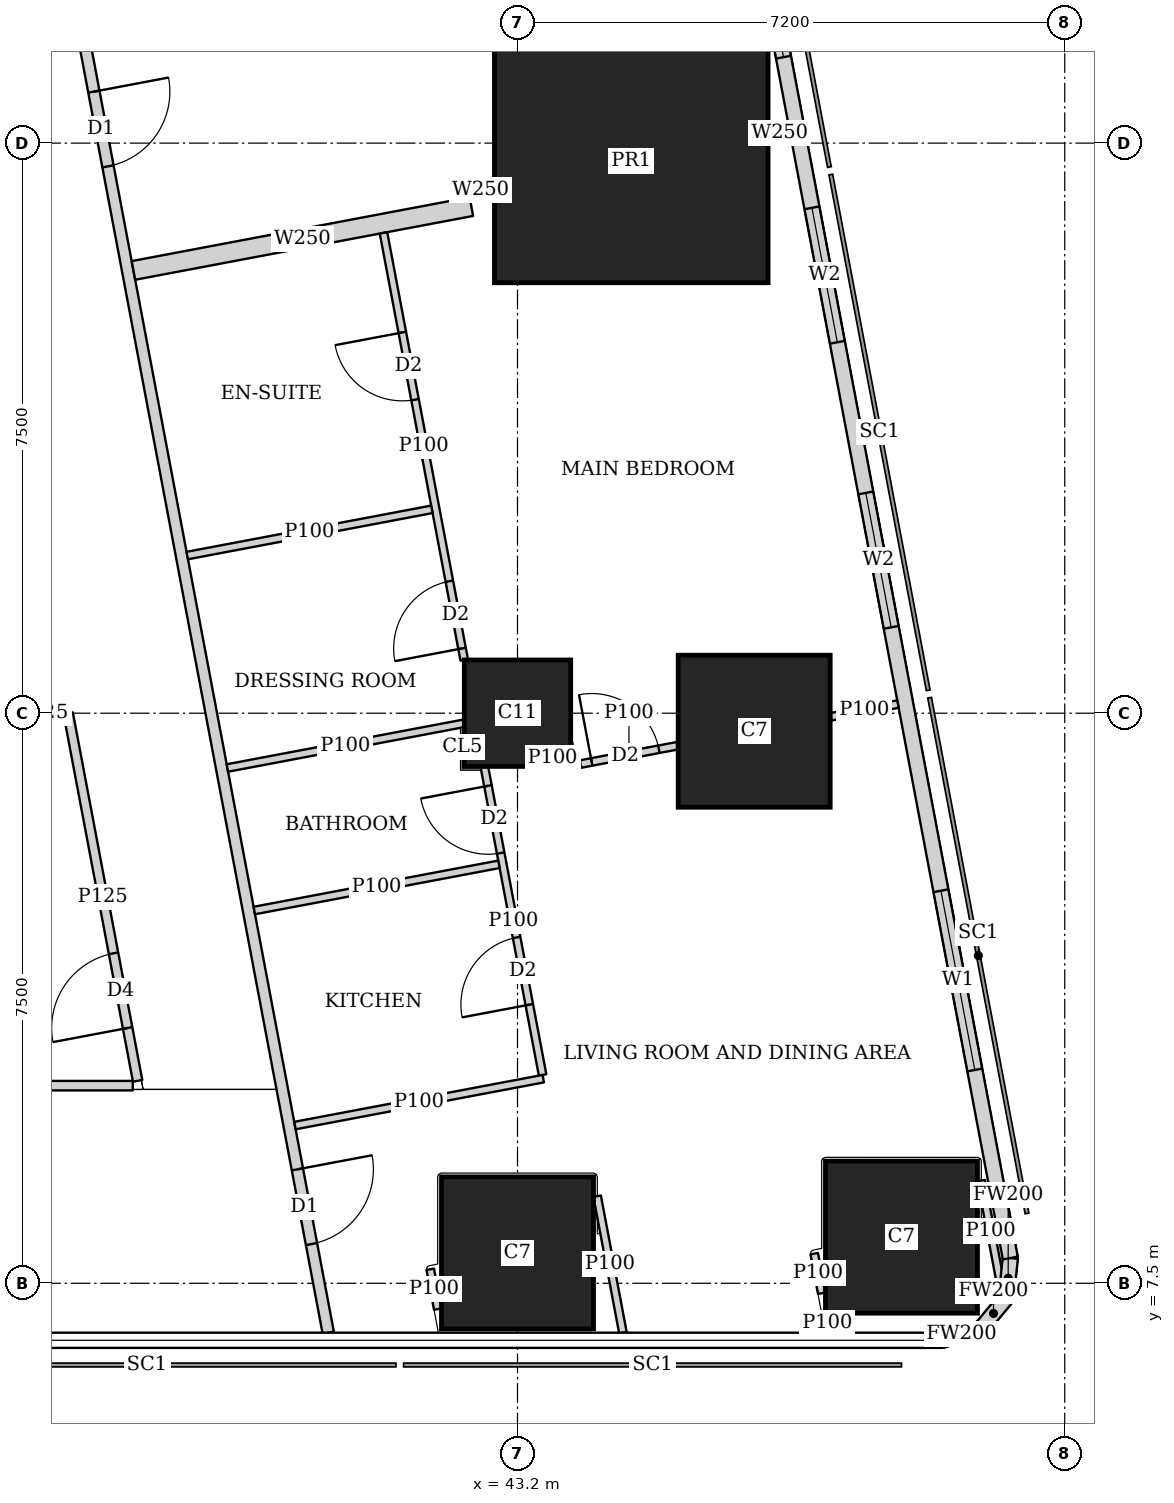
"""IFC4 building model, lengths in metres.
Left out: names, types, materials, properties, quantities, classifications, styles, units other than length and angle.
Written with IfcOpenShell. Run it as: python <this file> out.ifc"""

import sys

from ifc_helpers import new_model, si_unit, direction, frame, frame_2d, origin, origin_2d, place, context, subcontext, project, spatial, rectangle, extrude, element, fill, save


model = new_model("IFC4")
c1 = context("Model", 3, precision=1e-05, world=origin(), true_north=direction((0.0, 1.0)))
c2 = subcontext(c1, "Body", "Model", "MODEL_VIEW")
j1 = project(units=[si_unit("LENGTHUNIT", "METRE"), si_unit("PLANEANGLEUNIT", "RADIAN")], contexts=[c1])
p1 = place(None, origin())
s1 = spatial("IfcSite", under=j1, at=p1, CompositionType="ELEMENT")
p2 = place(p1, origin())
s2 = spatial("IfcBuilding", under=s1, at=p2, CompositionType="ELEMENT")
p3 = place(p2, frame((0.0, 0.0, 285.35)))
s3 = spatial("IfcBuildingStorey", under=s2, at=p3, CompositionType="ELEMENT", Elevation=285.35)
for number, where, z_axis, x_axis in (
    (1, (43.2, 7.9, 0.0), (0.0, 0.0, 1.0), (1.0, 0.0, 0.0)),
    (2, (48.252, 8.107, 0.0), (0.0, 0.0, 1.0), (1.0, 0.0, 0.0)),
):
    element("IfcColumn", number, at=place(p3, frame(where, z_axis=z_axis, x_axis=x_axis)), inside=s3, PredefinedType="COLUMN", context=c2, shape_type="SweptSolid", body=[
        extrude(rectangle(XDim=2.0, YDim=2.0, at=origin_2d()), origin(), (0.0, 0.0, 1.0), 3.75),
    ])
p4 = place(p3, frame((43.2, 15.0, 0.0), z_axis=(0.0, 0.0, 1.0), x_axis=(1.0, 0.0, 0.0)))
e3 = element("IfcColumn", 3, at=p4, inside=s3, PredefinedType="COLUMN", context=c2, shape_type="SweptSolid", body=[
    extrude(rectangle(XDim=1.4, YDim=1.4, at=origin_2d()), origin(), (0.0, 0.0, 1.0), 3.75),
])
p5 = place(p3, frame((46.314, 14.763, 0.0), z_axis=(0.0, 0.0, 1.0), x_axis=(1.0, 0.0, 0.0)))
e4 = element("IfcColumn", 4, at=p5, inside=s3, PredefinedType="COLUMN", context=c2, shape_type="SweptSolid", body=[
    extrude(rectangle(XDim=2.0, YDim=2.0, at=origin_2d()), origin(), (0.0, 0.0, 1.0), 3.75),
])
p6 = place(p3, frame((44.697, 22.263, 0.0), z_axis=(0.0, 0.0, 1.0), x_axis=(1.0, 0.0, 0.0)))
e5 = element("IfcColumn", 5, at=p6, inside=s3, PredefinedType="COLUMN", context=c2, shape_type="SweptSolid", body=[
    extrude(rectangle(XDim=3.6, YDim=3.2, at=origin_2d()), origin(), (0.0, 0.0, 1.0), 3.75),
])
p7 = place(p3, frame((48.787, 6.75, 0.0), z_axis=(0.0, 0.0, 1.0), x_axis=(0.957282247819, 0.289155145225, 0.0)))
e6 = element("IfcWall", 6, at=p7, inside=s3, PredefinedType="SOLIDWALL", context=c2, shape_type="SweptSolid", body=[
    extrude(rectangle(XDim=0.533, YDim=0.2, at=frame_2d((0.266, 0.0))), origin(), (0.0, 0.0, 1.0), 3.5),
])
p8 = place(p3, frame((49.297, 6.904, 0.0), z_axis=(0.0, 0.0, 1.0), x_axis=(0.639255849474, 0.768994121508, 0.0)))
e7 = element("IfcWall", 7, at=p8, inside=s3, PredefinedType="SOLIDWALL", context=c2, shape_type="SweptSolid", body=[
    extrude(rectangle(XDim=0.518, YDim=0.2, at=frame_2d((0.259, 0.0))), origin(), (0.0, 0.0, 1.0), 3.5),
])
p9 = place(p3, frame((49.628, 7.302, 0.0), z_axis=(0.0, 0.0, 1.0), x_axis=(0.105352390132, 0.994434952068, 0.0)))
e8 = element("IfcWall", 8, at=p9, inside=s3, PredefinedType="SOLIDWALL", context=c2, shape_type="SweptSolid", body=[
    extrude(rectangle(XDim=0.533, YDim=0.2, at=frame_2d((0.267, 0.0))), origin(), (0.0, 0.0, 1.0), 3.5),
])
p10 = place(p3, frame((49.684, 7.832, 0.0), z_axis=(0.0, 0.0, 1.0), x_axis=(-0.185616669694, 0.982622232565, 0.0)))
e9 = element("IfcWall", 9, at=p10, inside=s3, PredefinedType="SOLIDWALL", context=c2, shape_type="SweptSolid", body=[
    extrude(rectangle(XDim=36.0, YDim=0.2, at=frame_2d((18.0, 0.0))), origin(), (0.0, 0.0, 1.0), 3.5),
])
p11 = place(p10, frame((2.518, 0.0, 0.9)))
e10 = element("IfcOpeningElement", 10, at=p11, cuts=e9, PredefinedType="OPENING", context=c2, shape_type="SweptSolid", body=[
    extrude(rectangle(XDim=2.4, YDim=1.5, at=frame_2d((1.2, 0.75))), frame((0.0, 0.11, 0.0), z_axis=(0.0, -1.0, 0.0), x_axis=(1.0, 0.0, 0.0)), (0.0, 0.0, 1.0), 0.22),
])
p12 = place(p10, frame((8.444, 0.0, 0.9)))
e11 = element("IfcOpeningElement", 11, at=p12, cuts=e9, PredefinedType="OPENING", context=c2, shape_type="SweptSolid", body=[
    extrude(rectangle(XDim=1.8, YDim=1.5, at=frame_2d((0.9, 0.75))), frame((0.0, 0.11, 0.0), z_axis=(0.0, -1.0, 0.0), x_axis=(1.0, 0.0, 0.0)), (0.0, 0.0, 1.0), 0.22),
])
p13 = place(p10, frame((12.261, 0.0, 0.9)))
e12 = element("IfcOpeningElement", 12, at=p13, cuts=e9, PredefinedType="OPENING", context=c2, shape_type="SweptSolid", body=[
    extrude(rectangle(XDim=1.8, YDim=1.5, at=frame_2d((0.9, 0.75))), frame((0.0, 0.11, 0.0), z_axis=(0.0, -1.0, 0.0), x_axis=(1.0, 0.0, 0.0)), (0.0, 0.0, 1.0), 0.22),
])
p14 = place(p10, frame((16.078, 0.0, 0.9)))
e13 = element("IfcOpeningElement", 13, at=p14, cuts=e9, PredefinedType="OPENING", context=c2, shape_type="SweptSolid", body=[
    extrude(rectangle(XDim=1.8, YDim=1.5, at=frame_2d((0.9, 0.75))), frame((0.0, 0.11, 0.0), z_axis=(0.0, -1.0, 0.0), x_axis=(1.0, 0.0, 0.0)), (0.0, 0.0, 1.0), 0.22),
])
p15 = place(p10, frame((19.894, 0.0, 0.9)))
e14 = element("IfcOpeningElement", 14, at=p15, cuts=e9, PredefinedType="OPENING", context=c2, shape_type="SweptSolid", body=[
    extrude(rectangle(XDim=1.8, YDim=1.5, at=frame_2d((0.9, 0.75))), frame((0.0, 0.11, 0.0), z_axis=(0.0, -1.0, 0.0), x_axis=(1.0, 0.0, 0.0)), (0.0, 0.0, 1.0), 0.22),
])
p16 = place(p10, frame((23.71, 0.0, 0.9)))
e15 = element("IfcOpeningElement", 15, at=p16, cuts=e9, PredefinedType="OPENING", context=c2, shape_type="SweptSolid", body=[
    extrude(rectangle(XDim=1.8, YDim=1.5, at=frame_2d((0.9, 0.75))), frame((0.0, 0.11, 0.0), z_axis=(0.0, -1.0, 0.0), x_axis=(1.0, 0.0, 0.0)), (0.0, 0.0, 1.0), 0.22),
])
p17 = place(p10, frame((27.526, 0.0, 0.9)))
e16 = element("IfcOpeningElement", 16, at=p17, cuts=e9, PredefinedType="OPENING", context=c2, shape_type="SweptSolid", body=[
    extrude(rectangle(XDim=1.8, YDim=1.5, at=frame_2d((0.9, 0.75))), frame((0.0, 0.11, 0.0), z_axis=(0.0, -1.0, 0.0), x_axis=(1.0, 0.0, 0.0)), (0.0, 0.0, 1.0), 0.22),
])
p18 = place(p10, frame((32.046, 0.0, 0.9)))
e17 = element("IfcOpeningElement", 17, at=p18, cuts=e9, PredefinedType="OPENING", context=c2, shape_type="SweptSolid", body=[
    extrude(rectangle(XDim=1.8, YDim=1.5, at=frame_2d((0.9, 0.75))), frame((0.0, 0.11, 0.0), z_axis=(0.0, -1.0, 0.0), x_axis=(1.0, 0.0, 0.0)), (0.0, 0.0, 1.0), 0.22),
])
p19 = place(p3, frame((34.036, 42.186, 0.0), z_axis=(0.0, 0.0, 1.0), x_axis=(0.185593518645, -0.9826266055, 0.0)))
e18 = element("IfcWall", 18, at=p19, inside=s3, PredefinedType="SOLIDWALL", context=c2, shape_type="SweptSolid", body=[
    extrude(rectangle(XDim=35.961, YDim=0.15, at=frame_2d((17.98, 0.0))), origin(), (0.0, 0.0, 1.0), 2.5),
])
p20 = place(p19, frame((19.345, 0.0, 0.0)))
e19 = element("IfcOpeningElement", 19, at=p20, cuts=e18, PredefinedType="OPENING", context=c2, shape_type="SweptSolid", body=[
    extrude(rectangle(XDim=1.0, YDim=2.1, at=frame_2d((0.5, 1.05))), frame((0.0, 0.085, 0.0), z_axis=(0.0, -1.0, 0.0), x_axis=(1.0, 0.0, 0.0)), (0.0, 0.0, 1.0), 0.17),
])
p21 = place(p19, frame((33.774, 0.0, 0.0)))
e20 = element("IfcOpeningElement", 20, at=p21, cuts=e18, PredefinedType="OPENING", context=c2, shape_type="SweptSolid", body=[
    extrude(rectangle(XDim=1.0, YDim=2.1, at=frame_2d((0.5, 1.05))), frame((0.0, 0.085, 0.0), z_axis=(0.0, -1.0, 0.0), x_axis=(1.0, 0.0, 0.0)), (0.0, 0.0, 1.0), 0.17),
])
p22 = place(p3, frame((44.248, 8.646, 0.0), z_axis=(0.0, 0.0, 1.0), x_axis=(0.185417594585, -0.982659816833, 0.0)))
e21 = element("IfcWall", 21, at=p22, inside=s3, PredefinedType="PARTITIONING", context=c2, shape_type="SweptSolid", body=[
    extrude(rectangle(XDim=1.828, YDim=0.1, at=frame_2d((0.914, 0.0))), origin(), (0.0, 0.0, 1.0), 2.05),
])
p23 = place(p3, frame((42.151, 7.16, 0.0), z_axis=(0.0, 0.0, 1.0), x_axis=(-0.185366164644, 0.982669519729, 0.0)))
e22 = element("IfcWall", 22, at=p23, inside=s3, PredefinedType="PARTITIONING", context=c2, shape_type="SweptSolid", body=[
    extrude(rectangle(XDim=0.533, YDim=0.1, at=frame_2d((0.267, 0.0))), origin(), (0.0, 0.0, 1.0), 2.5),
])
p24 = place(p3, frame((49.3, 8.851, 0.0), z_axis=(0.0, 0.0, 1.0), x_axis=(0.18581620423, -0.982584519645, 0.0)))
e23 = element("IfcWall", 23, at=p24, inside=s3, PredefinedType="PARTITIONING", context=c2, shape_type="SweptSolid", body=[
    extrude(rectangle(XDim=1.351, YDim=0.1, at=frame_2d((0.675, 0.0))), origin(), (0.0, 0.0, 1.0), 3.5),
])
p25 = place(p3, frame((47.301, 6.85, 0.0), z_axis=(0.0, 0.0, 1.0), x_axis=(-0.187513903188, 0.982261948826, 0.0)))
e24 = element("IfcWall", 24, at=p25, inside=s3, PredefinedType="PARTITIONING", context=c2, shape_type="SweptSolid", body=[
    extrude(rectangle(XDim=0.251, YDim=0.1, at=frame_2d((0.125, 0.0))), origin(), (0.0, 0.0, 1.0), 3.5),
])
p26 = place(p3, frame((47.203, 7.369, 0.0), z_axis=(0.0, 0.0, 1.0), x_axis=(-0.186456243114, 0.982463266185, 0.0)))
e25 = element("IfcWall", 25, at=p26, inside=s3, PredefinedType="PARTITIONING", context=c2, shape_type="SweptSolid", body=[
    extrude(rectangle(XDim=0.53, YDim=0.1, at=frame_2d((0.265, 0.0))), origin(), (0.0, 0.0, 1.0), 2.05),
])
p27 = place(p3, frame((46.782, 22.657, 0.0), z_axis=(0.0, 0.0, 1.0), x_axis=(-0.982104607121, -0.188336243648, 0.0)))
e26 = element("IfcWall", 26, at=p27, inside=s3, PredefinedType="SOLIDWALL", context=c2, shape_type="SweptSolid", body=[
    extrude(rectangle(XDim=0.266, YDim=0.25, at=frame_2d((0.133, 0.0))), origin(), (0.0, 0.0, 1.0), 3.5),
])
p28 = place(p3, frame((42.873, 21.918, 0.0), z_axis=(0.0, 0.0, 1.0), x_axis=(-0.982431406936, -0.186624035603, 0.0)))
e27 = element("IfcWall", 27, at=p28, inside=s3, PredefinedType="SOLIDWALL", context=c2, shape_type="SweptSolid", body=[
    extrude(rectangle(XDim=0.322, YDim=0.25, at=frame_2d((0.161, 0.0))), origin(), (0.0, 0.0, 1.0), 2.5),
])
p29 = place(p3, frame((42.593, 21.665, 0.0), z_axis=(0.0, 0.0, 1.0), x_axis=(-0.982612837616, -0.185666398014, 0.0)))
e28 = element("IfcWall", 28, at=p29, inside=s3, PredefinedType="SOLIDWALL", context=c2, shape_type="SweptSolid", body=[
    extrude(rectangle(XDim=4.525, YDim=0.25, at=frame_2d((2.262, 0.0))), origin(), (0.0, 0.0, 1.0), 2.5),
])
p30 = place(p3, frame((48.206, 15.12, 0.0), z_axis=(0.0, 0.0, 1.0), x_axis=(-0.982497680814, -0.186274816318, 0.0)))
e29 = element("IfcWall", 29, at=p30, inside=s3, PredefinedType="PARTITIONING", context=c2, shape_type="SweptSolid", body=[
    extrude(rectangle(XDim=0.898, YDim=0.1, at=frame_2d((0.449, 0.0))), origin(), (0.0, 0.0, 1.0), 3.5),
])
p31 = place(p3, frame((45.304, 14.572, 0.0), z_axis=(0.0, 0.0, 1.0), x_axis=(-0.982602741717, -0.185719821156, 0.0)))
e30 = element("IfcWall", 30, at=p31, inside=s3, PredefinedType="PARTITIONING", context=c2, shape_type="SweptSolid", body=[
    extrude(rectangle(XDim=1.297, YDim=0.1, at=frame_2d((0.649, 0.0))), origin(), (0.0, 0.0, 1.0), 3.5),
])
p32 = place(p31, frame((0.248, 0.0, 0.0)))
e31 = element("IfcOpeningElement", 31, at=p32, cuts=e30, PredefinedType="OPENING", context=c2, shape_type="SweptSolid", body=[
    extrude(rectangle(XDim=0.9, YDim=2.1, at=frame_2d((0.45, 1.05))), frame((0.0, 0.06, 0.0), z_axis=(0.0, -1.0, 0.0), x_axis=(1.0, 0.0, 0.0)), (0.0, 0.0, 1.0), 0.12),
])
p33 = place(p3, frame((43.949, 14.485, 0.0), z_axis=(0.0, 0.0, 1.0), x_axis=(0.188651210932, -0.982044154106, 0.0)))
e32 = element("IfcWall", 32, at=p33, inside=s3, PredefinedType="PARTITIONING", context=c2, shape_type="SweptSolid", body=[
    extrude(rectangle(XDim=0.138, YDim=0.1, at=frame_2d((0.069, 0.0))), origin(), (0.0, 0.0, 1.0), 3.5),
])
p34 = place(p3, frame((42.073, 17.682, 0.0), z_axis=(0.0, 0.0, 1.0), x_axis=(-0.982620626894, -0.185625169636, 0.0)))
e33 = element("IfcWall", 33, at=p34, inside=s3, PredefinedType="PARTITIONING", context=c2, shape_type="SweptSolid", body=[
    extrude(rectangle(XDim=3.275, YDim=0.1, at=frame_2d((1.637, 0.0))), origin(), (0.0, 0.0, 1.0), 3.5),
])
p35 = place(p3, frame((42.49, 14.866, 0.0), z_axis=(0.0, 0.0, 1.0), x_axis=(-0.982621285075, -0.185621685472, 0.0)))
e34 = element("IfcWall", 34, at=p35, inside=s3, PredefinedType="PARTITIONING", context=c2, shape_type="SweptSolid", body=[
    extrude(rectangle(XDim=3.162, YDim=0.1, at=frame_2d((1.581, 0.0))), origin(), (0.0, 0.0, 1.0), 3.5),
])
p36 = place(p3, frame((42.956, 13.012, 0.0), z_axis=(0.0, 0.0, 1.0), x_axis=(-0.982630897129, -0.185570795135, 0.0)))
e35 = element("IfcWall", 35, at=p36, inside=s3, PredefinedType="PARTITIONING", context=c2, shape_type="SweptSolid", body=[
    extrude(rectangle(XDim=3.276, YDim=0.1, at=frame_2d((1.638, 0.0))), origin(), (0.0, 0.0, 1.0), 3.5),
])
p37 = place(p3, frame((43.539, 10.192, 0.0), z_axis=(0.0, 0.0, 1.0), x_axis=(-0.982633623707, -0.185556356831, 0.0)))
e36 = element("IfcWall", 36, at=p37, inside=s3, PredefinedType="PARTITIONING", context=c2, shape_type="SweptSolid", body=[
    extrude(rectangle(XDim=3.325, YDim=0.1, at=frame_2d((1.663, 0.0))), origin(), (0.0, 0.0, 1.0), 3.5),
])
p38 = place(p3, frame((41.437, 21.319, 0.0), z_axis=(0.0, 0.0, 1.0), x_axis=(0.185742368638, -0.982598479794, 0.0)))
e37 = element("IfcWall", 37, at=p38, inside=s3, PredefinedType="PARTITIONING", context=c2, shape_type="SweptSolid", body=[
    extrude(rectangle(XDim=5.718, YDim=0.1, at=frame_2d((2.859, 0.0))), origin(), (0.0, 0.0, 1.0), 3.5),
])
p39 = place(p38, frame((1.333, 0.0, 0.0)))
e38 = element("IfcOpeningElement", 38, at=p39, cuts=e37, PredefinedType="OPENING", context=c2, shape_type="SweptSolid", body=[
    extrude(rectangle(XDim=0.9, YDim=2.1, at=frame_2d((0.45, 1.05))), frame((0.0, 0.06, 0.0), z_axis=(0.0, -1.0, 0.0), x_axis=(1.0, 0.0, 0.0)), (0.0, 0.0, 1.0), 0.12),
])
p40 = place(p38, frame((4.664, 0.0, 0.0)))
e39 = element("IfcOpeningElement", 39, at=p40, cuts=e37, PredefinedType="OPENING", context=c2, shape_type="SweptSolid", body=[
    extrude(rectangle(XDim=0.9, YDim=2.1, at=frame_2d((0.45, 1.05))), frame((0.0, 0.06, 0.0), z_axis=(0.0, -1.0, 0.0), x_axis=(1.0, 0.0, 0.0)), (0.0, 0.0, 1.0), 0.12),
])
p41 = place(p3, frame((42.765, 14.29, 0.0), z_axis=(0.0, 0.0, 1.0), x_axis=(0.185679870644, -0.982610291844, 0.0)))
e40 = element("IfcWall", 40, at=p41, inside=s3, PredefinedType="PARTITIONING", context=c2, shape_type="SweptSolid", body=[
    extrude(rectangle(XDim=4.121, YDim=0.1, at=frame_2d((2.061, 0.0))), origin(), (0.0, 0.0, 1.0), 3.5),
])
p42 = place(p41, frame((0.25, 0.0, 0.0)))
e41 = element("IfcOpeningElement", 41, at=p42, cuts=e40, PredefinedType="OPENING", context=c2, shape_type="SweptSolid", body=[
    extrude(rectangle(XDim=0.9, YDim=2.1, at=frame_2d((0.45, 1.05))), frame((0.0, 0.06, 0.0), z_axis=(0.0, -1.0, 0.0), x_axis=(1.0, 0.0, 0.0)), (0.0, 0.0, 1.0), 0.12),
])
p43 = place(p41, frame((2.28, 0.0, 0.0)))
e42 = element("IfcOpeningElement", 42, at=p43, cuts=e40, PredefinedType="OPENING", context=c2, shape_type="SweptSolid", body=[
    extrude(rectangle(XDim=0.9, YDim=2.1, at=frame_2d((0.45, 1.05))), frame((0.0, 0.06, 0.0), z_axis=(0.0, -1.0, 0.0), x_axis=(1.0, 0.0, 0.0)), (0.0, 0.0, 1.0), 0.12),
])
p44 = place(p3, frame((28.95, 10.1, 0.0), z_axis=(0.0, 0.0, 1.0), x_axis=(1.0, 0.0, 0.0)))
e43 = element("IfcWall", 43, at=p44, inside=s3, PredefinedType="PARTITIONING", context=c2, shape_type="SweptSolid", body=[
    extrude(rectangle(XDim=9.188, YDim=0.125, at=frame_2d((4.594, 0.0))), origin(), (0.0, 0.0, 1.0), 3.5),
])
p45 = place(p3, frame((38.202, 10.163, 0.0), z_axis=(0.0, 0.0, 1.0), x_axis=(-0.185641892853, 0.982617467593, 0.0)))
e44 = element("IfcWall", 44, at=p45, inside=s3, PredefinedType="PARTITIONING", context=c2, shape_type="SweptSolid", body=[
    extrude(rectangle(XDim=4.922, YDim=0.125, at=frame_2d((2.461, 0.0))), origin(), (0.0, 0.0, 1.0), 3.5),
])
p46 = place(p45, frame((0.708, 0.0, 0.0)))
e45 = element("IfcOpeningElement", 45, at=p46, cuts=e44, PredefinedType="OPENING", context=c2, shape_type="SweptSolid", body=[
    extrude(rectangle(XDim=1.0, YDim=2.1, at=frame_2d((0.5, 1.05))), frame((0.0, 0.073, 0.0), z_axis=(0.0, -1.0, 0.0), x_axis=(1.0, 0.0, 0.0)), (0.0, 0.0, 1.0), 0.145),
])
p47 = place(p3, frame((36.701, 15.0, 0.0), z_axis=(0.0, 0.0, 1.0), x_axis=(1.0, 0.0, 0.0)))
e46 = element("IfcWall", 46, at=p47, inside=s3, PredefinedType="PARTITIONING", context=c2, shape_type="SweptSolid", body=[
    extrude(rectangle(XDim=0.526, YDim=0.125, at=frame_2d((0.263, 0.0))), origin(), (0.0, 0.0, 1.0), 3.5),
])
p48 = place(p11, origin())
e47 = element("IfcWindow", 47, at=p48, inside=s3, PartitioningType="SINGLE_PANEL", PredefinedType="WINDOW", context=c2, shape_type="SweptSolid", body=[
    extrude(rectangle(XDim=2.4, YDim=1.5, at=frame_2d((1.2, 0.75))), frame((0.0, 0.03, 0.0), z_axis=(0.0, -1.0, 0.0), x_axis=(1.0, 0.0, 0.0)), (0.0, 0.0, 1.0), 0.06),
])
fill(e10, e47)
p49 = place(p12, origin())
e48 = element("IfcWindow", 48, at=p49, inside=s3, PartitioningType="SINGLE_PANEL", PredefinedType="WINDOW", context=c2, shape_type="SweptSolid", body=[
    extrude(rectangle(XDim=1.8, YDim=1.5, at=frame_2d((0.9, 0.75))), frame((0.0, 0.03, 0.0), z_axis=(0.0, -1.0, 0.0), x_axis=(1.0, 0.0, 0.0)), (0.0, 0.0, 1.0), 0.06),
])
fill(e11, e48)
p50 = place(p13, origin())
e49 = element("IfcWindow", 49, at=p50, inside=s3, PartitioningType="SINGLE_PANEL", PredefinedType="WINDOW", context=c2, shape_type="SweptSolid", body=[
    extrude(rectangle(XDim=1.8, YDim=1.5, at=frame_2d((0.9, 0.75))), frame((0.0, 0.03, 0.0), z_axis=(0.0, -1.0, 0.0), x_axis=(1.0, 0.0, 0.0)), (0.0, 0.0, 1.0), 0.06),
])
fill(e12, e49)
p51 = place(p14, origin())
e50 = element("IfcWindow", 50, at=p51, inside=s3, PartitioningType="SINGLE_PANEL", PredefinedType="WINDOW", context=c2, shape_type="SweptSolid", body=[
    extrude(rectangle(XDim=1.8, YDim=1.5, at=frame_2d((0.9, 0.75))), frame((0.0, 0.03, 0.0), z_axis=(0.0, -1.0, 0.0), x_axis=(1.0, 0.0, 0.0)), (0.0, 0.0, 1.0), 0.06),
])
fill(e13, e50)
p52 = place(p20, origin())
e51 = element("IfcDoor", 51, at=p52, inside=s3, OperationType="SINGLE_SWING_LEFT", PredefinedType="DOOR", context=c2, shape_type="SweptSolid", body=[
    extrude(rectangle(XDim=1.0, YDim=2.1, at=frame_2d((0.5, 1.05))), frame((0.0, 0.025, 0.0), z_axis=(0.0, -1.0, 0.0), x_axis=(1.0, 0.0, 0.0)), (0.0, 0.0, 1.0), 0.05),
])
fill(e19, e51)
p53 = place(p32, origin())
e52 = element("IfcDoor", 52, at=p53, inside=s3, OperationType="SINGLE_SWING_LEFT", PredefinedType="DOOR", context=c2, shape_type="SweptSolid", body=[
    extrude(rectangle(XDim=0.9, YDim=2.1, at=frame_2d((0.45, 1.05))), frame((0.0, 0.025, 0.0), z_axis=(0.0, -1.0, 0.0), x_axis=(1.0, 0.0, 0.0)), (0.0, 0.0, 1.0), 0.05),
])
fill(e31, e52)
p54 = place(p39, origin())
e53 = element("IfcDoor", 53, at=p54, inside=s3, OperationType="SINGLE_SWING_RIGHT", PredefinedType="DOOR", context=c2, shape_type="SweptSolid", body=[
    extrude(rectangle(XDim=0.9, YDim=2.1, at=frame_2d((0.45, 1.05))), frame((0.0, 0.025, 0.0), z_axis=(0.0, -1.0, 0.0), x_axis=(1.0, 0.0, 0.0)), (0.0, 0.0, 1.0), 0.05),
])
fill(e38, e53)
p55 = place(p40, origin())
e54 = element("IfcDoor", 54, at=p55, inside=s3, OperationType="SINGLE_SWING_LEFT", PredefinedType="DOOR", context=c2, shape_type="SweptSolid", body=[
    extrude(rectangle(XDim=0.9, YDim=2.1, at=frame_2d((0.45, 1.05))), frame((0.0, 0.025, 0.0), z_axis=(0.0, -1.0, 0.0), x_axis=(1.0, 0.0, 0.0)), (0.0, 0.0, 1.0), 0.05),
])
fill(e39, e54)
p56 = place(p42, origin())
e55 = element("IfcDoor", 55, at=p56, inside=s3, OperationType="SINGLE_SWING_RIGHT", PredefinedType="DOOR", context=c2, shape_type="SweptSolid", body=[
    extrude(rectangle(XDim=0.9, YDim=2.1, at=frame_2d((0.45, 1.05))), frame((0.0, 0.025, 0.0), z_axis=(0.0, -1.0, 0.0), x_axis=(1.0, 0.0, 0.0)), (0.0, 0.0, 1.0), 0.05),
])
fill(e41, e55)
p57 = place(p43, origin())
e56 = element("IfcDoor", 56, at=p57, inside=s3, OperationType="SINGLE_SWING_LEFT", PredefinedType="DOOR", context=c2, shape_type="SweptSolid", body=[
    extrude(rectangle(XDim=0.9, YDim=2.1, at=frame_2d((0.45, 1.05))), frame((0.0, 0.025, 0.0), z_axis=(0.0, -1.0, 0.0), x_axis=(1.0, 0.0, 0.0)), (0.0, 0.0, 1.0), 0.05),
])
fill(e42, e56)
p58 = place(p21, origin())
e57 = element("IfcDoor", 57, at=p58, inside=s3, OperationType="SINGLE_SWING_LEFT", PredefinedType="DOOR", context=c2, shape_type="SweptSolid", body=[
    extrude(rectangle(XDim=1.0, YDim=2.1, at=frame_2d((0.5, 1.05))), frame((0.0, 0.025, 0.0), z_axis=(0.0, -1.0, 0.0), x_axis=(1.0, 0.0, 0.0)), (0.0, 0.0, 1.0), 0.05),
])
fill(e20, e57)
p59 = place(p46, origin())
e58 = element("IfcDoor", 58, at=p59, inside=s3, OperationType="SINGLE_SWING_LEFT", PredefinedType="DOOR", context=c2, shape_type="SweptSolid", body=[
    extrude(rectangle(XDim=1.0, YDim=2.1, at=frame_2d((0.5, 1.05))), frame((0.0, 0.025, 0.0), z_axis=(0.0, -1.0, 0.0), x_axis=(1.0, 0.0, 0.0)), (0.0, 0.0, 1.0), 0.05),
])
fill(e45, e58)
save(model, sys.argv[1])
